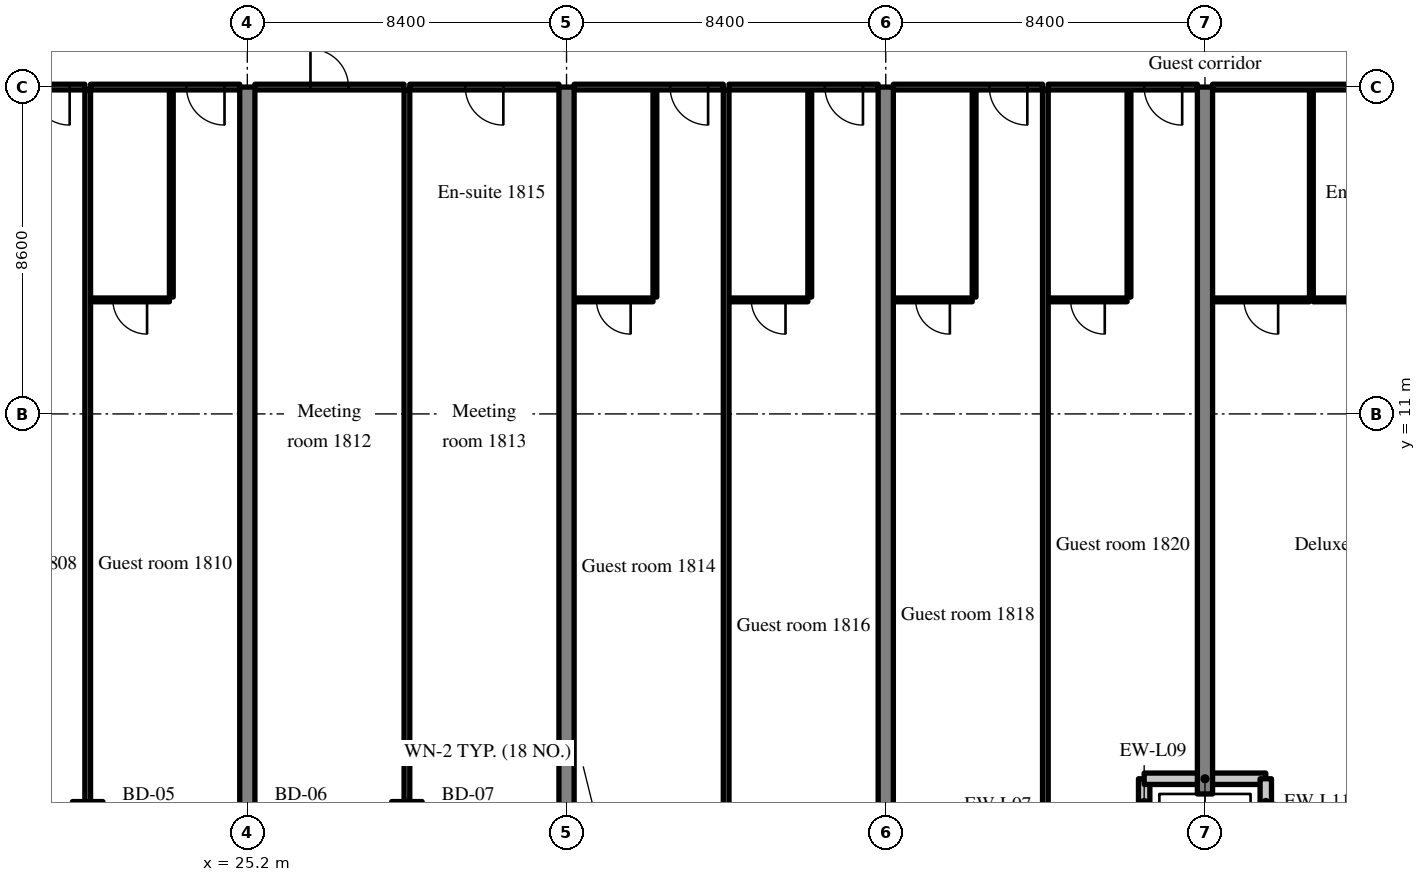
"""IFC4 building model, lengths in metres.
Left out: names, types, materials, properties, quantities, classifications, styles, units other than length and angle.
Written with IfcOpenShell. Run it as: python <this file> out.ifc"""

import sys

from ifc_helpers import new_model, si_unit, direction, frame, frame_2d, origin, origin_2d, place, context, subcontext, project, spatial, rectangle, extrude, source, transform, mapped, element, fill, save


model = new_model("IFC4")
c1 = context("Model", 3, precision=1e-05, world=origin(), true_north=direction((0.0, 1.0)))
c2 = subcontext(c1, "Body", "Model", "MODEL_VIEW")
j1 = project(units=[si_unit("LENGTHUNIT", "METRE"), si_unit("PLANEANGLEUNIT", "RADIAN")], contexts=[c1])
p1 = place(None, origin())
s1 = spatial("IfcSite", under=j1, at=p1, CompositionType="ELEMENT")
p2 = place(p1, origin())
s2 = spatial("IfcBuilding", under=s1, at=p2, CompositionType="ELEMENT")
p3 = place(p2, frame((0.0, 0.0, 77.2)))
s3 = spatial("IfcBuildingStorey", under=s2, at=p3, CompositionType="ELEMENT", Elevation=77.2)
m1 = source(origin(), c2, "Body", "SweptSolid", [
    extrude(rectangle(XDim=19.6, YDim=0.4, at=frame_2d((9.8, 0.0))), origin(), (0.0, 0.0, 1.0), 3.52),
])
for number, where, z_axis, x_axis in (
    (1, (25.2, 0.0, 0.0), (0.0, 0.0, 1.0), (0.0, 1.0, 0.0)),
    (2, (33.6, 0.0, 0.0), (0.0, 0.0, 1.0), (0.0, 1.0, 0.0)),
    (3, (42.0, 0.0, 0.0), (0.0, 0.0, 1.0), (0.0, 1.0, 0.0)),
):
    element("IfcWall", number, at=place(p3, frame(where, z_axis=z_axis, x_axis=x_axis)), inside=s3, PredefinedType="SHEAR", context=c2, shape_type="MappedRepresentation", body=[
        mapped(m1, transform((0.0, 0.0, 0.0), scale=1.0)),
    ])
m2 = source(origin(), c2, "Body", "SweptSolid", [
    extrude(rectangle(XDim=18.6, YDim=0.4, at=frame_2d((9.3, 0.0))), origin(), (0.0, 0.0, 1.0), 3.52),
])
p4 = place(p3, frame((50.4, 1.0, 0.0), z_axis=(0.0, 0.0, 1.0), x_axis=(0.0, 1.0, 0.0)))
e4 = element("IfcWall", 4, at=p4, inside=s3, PredefinedType="SHEAR", context=c2, shape_type="MappedRepresentation", body=[
    mapped(m2, transform((0.0, 0.0, 0.0), scale=1.0)),
])
m3 = source(origin(), c2, "Body", "SweptSolid", [
    extrude(rectangle(XDim=0.8, YDim=0.8, at=origin_2d()), origin(), (0.0, 0.0, 1.0), 3.52),
])
for number, where, z_axis, x_axis in (
    (5, (21.0, 0.4, 0.0), (0.0, 0.0, 1.0), (1.0, 0.0, 0.0)),
    (6, (29.4, 0.4, 0.0), (0.0, 0.0, 1.0), (1.0, 0.0, 0.0)),
):
    element("IfcColumn", number, at=place(p3, frame(where, z_axis=z_axis, x_axis=x_axis)), inside=s3, PredefinedType="COLUMN", context=c2, shape_type="MappedRepresentation", body=[
        mapped(m3, transform((0.0, 0.0, 0.0), scale=1.0)),
    ])
m4 = source(origin(), c2, "Body", "SweptSolid", [
    extrude(rectangle(XDim=1.244, YDim=0.3, at=frame_2d((0.622, 0.0))), origin(), (0.0, 0.0, 1.0), 2.32),
])
p5 = place(p3, frame((48.8, 0.156, 0.0), z_axis=(0.0, 0.0, 1.0), x_axis=(0.0, 1.0, 0.0)))
e7 = element("IfcWall", 7, at=p5, inside=s3, PredefinedType="SOLIDWALL", context=c2, shape_type="MappedRepresentation", body=[
    mapped(m4, transform((0.0, 0.0, 0.0), scale=1.0)),
])
m5 = source(origin(), c2, "Body", "SweptSolid", [
    extrude(rectangle(XDim=3.2, YDim=0.3, at=frame_2d((1.6, 0.0))), origin(), (0.0, 0.0, 1.0), 2.32),
])
p6 = place(p3, frame((48.8, 1.4, 0.0), z_axis=(0.0, 0.0, 1.0), x_axis=(1.0, 0.0, 0.0)))
e8 = element("IfcWall", 8, at=p6, inside=s3, PredefinedType="SOLIDWALL", context=c2, shape_type="MappedRepresentation", body=[
    mapped(m5, transform((0.0, 0.0, 0.0), scale=1.0)),
])
p7 = place(p3, frame((52.0, 1.4, 0.0), z_axis=(0.0, 0.0, 1.0), x_axis=(0.0, -1.0, 0.0)))
e9 = element("IfcWall", 9, at=p7, inside=s3, PredefinedType="SOLIDWALL", context=c2, shape_type="MappedRepresentation", body=[
    mapped(m4, transform((0.0, 0.0, 0.0), scale=1.0)),
])
m6 = source(origin(), c2, "Body", "SweptSolid", [
    extrude(rectangle(XDim=3.925, YDim=0.15, at=frame_2d((1.962, 0.0))), origin(), (0.0, 0.0, 1.0), 2.82),
])
p8 = place(p3, frame((17.0, 19.6, 0.0), z_axis=(0.0, 0.0, 1.0), x_axis=(1.0, 0.0, 0.0)))
e10 = element("IfcWall", 10, at=p8, inside=s3, PredefinedType="PARTITIONING", context=c2, shape_type="MappedRepresentation", body=[
    mapped(m6, transform((0.0, 0.0, 0.0), scale=1.0)),
])
m7 = source(origin(), c2, "Body", "SweptSolid", [
    extrude(rectangle(XDim=1.0, YDim=2.1, at=frame_2d((0.5, 1.05))), frame((0.0, 0.085, 0.0), z_axis=(0.0, -1.0, 0.0), x_axis=(1.0, 0.0, 0.0)), (0.0, 0.0, 1.0), 0.17),
])
p9 = place(p8, frame((2.525, 0.0, 0.0)))
e11 = element("IfcOpeningElement", 11, at=p9, cuts=e10, PredefinedType="OPENING", context=c2, shape_type="MappedRepresentation", body=[
    mapped(m7, transform((0.0, 0.0, 0.0), scale=1.0)),
])
m8 = source(origin(), c2, "Body", "SweptSolid", [
    extrude(rectangle(XDim=5.45, YDim=0.1, at=frame_2d((2.725, 0.0))), origin(), (0.0, 0.0, 1.0), 3.52),
])
p10 = place(p3, frame((23.2, 14.075, 0.0), z_axis=(0.0, 0.0, 1.0), x_axis=(0.0, 1.0, 0.0)))
e12 = element("IfcWall", 12, at=p10, inside=s3, PredefinedType="PARTITIONING", context=c2, shape_type="MappedRepresentation", body=[
    mapped(m8, transform((0.0, 0.0, 0.0), scale=1.0)),
])
m9 = source(origin(), c2, "Body", "SweptSolid", [
    extrude(rectangle(XDim=2.075, YDim=0.1, at=frame_2d((1.038, 0.0))), origin(), (0.0, 0.0, 1.0), 3.52),
])
p11 = place(p3, frame((21.075, 14.0, 0.0), z_axis=(0.0, 0.0, 1.0), x_axis=(1.0, 0.0, 0.0)))
e13 = element("IfcWall", 13, at=p11, inside=s3, PredefinedType="PARTITIONING", context=c2, shape_type="MappedRepresentation", body=[
    mapped(m9, transform((0.0, 0.0, 0.0), scale=1.0)),
])
m10 = source(origin(), c2, "Body", "SweptSolid", [
    extrude(rectangle(XDim=0.9, YDim=2.1, at=frame_2d((0.45, 1.05))), frame((0.0, 0.06, 0.0), z_axis=(0.0, -1.0, 0.0), x_axis=(1.0, 0.0, 0.0)), (0.0, 0.0, 1.0), 0.12),
])
p12 = place(p11, frame((0.587, 0.0, 0.0)))
e14 = element("IfcOpeningElement", 14, at=p12, cuts=e13, PredefinedType="OPENING", context=c2, shape_type="MappedRepresentation", body=[
    mapped(m10, transform((0.0, 0.0, 0.0), scale=1.0)),
])
p13 = place(p3, frame((21.075, 19.6, 0.0), z_axis=(0.0, 0.0, 1.0), x_axis=(1.0, 0.0, 0.0)))
e15 = element("IfcWall", 15, at=p13, inside=s3, PredefinedType="PARTITIONING", context=c2, shape_type="MappedRepresentation", body=[
    mapped(m6, transform((0.0, 0.0, 0.0), scale=1.0)),
])
p14 = place(p13, frame((2.525, 0.0, 0.0)))
e16 = element("IfcOpeningElement", 16, at=p14, cuts=e15, PredefinedType="OPENING", context=c2, shape_type="MappedRepresentation", body=[
    mapped(m7, transform((0.0, 0.0, 0.0), scale=1.0)),
])
m11 = source(origin(), c2, "Body", "SweptSolid", [
    extrude(rectangle(XDim=18.725, YDim=0.15, at=frame_2d((9.362, 0.0))), origin(), (0.0, 0.0, 1.0), 3.52),
])
p15 = place(p3, frame((21.0, 0.8, 0.0), z_axis=(0.0, 0.0, 1.0), x_axis=(0.0, 1.0, 0.0)))
e17 = element("IfcWall", 17, at=p15, inside=s3, PredefinedType="PARTITIONING", context=c2, shape_type="MappedRepresentation", body=[
    mapped(m11, transform((0.0, 0.0, 0.0), scale=1.0)),
])
p16 = place(p3, frame((25.4, 19.6, 0.0), z_axis=(0.0, 0.0, 1.0), x_axis=(1.0, 0.0, 0.0)))
e18 = element("IfcWall", 18, at=p16, inside=s3, PredefinedType="PARTITIONING", context=c2, shape_type="MappedRepresentation", body=[
    mapped(m6, transform((0.0, 0.0, 0.0), scale=1.0)),
])
p17 = place(p16, frame((1.462, 0.0, 0.0)))
e19 = element("IfcOpeningElement", 19, at=p17, cuts=e18, PredefinedType="OPENING", context=c2, shape_type="MappedRepresentation", body=[
    mapped(m7, transform((0.0, 0.0, 0.0), scale=1.0)),
])
m12 = source(origin(), c2, "Body", "SweptSolid", [
    extrude(rectangle(XDim=3.925, YDim=0.15, at=frame_2d((1.962, 0.0))), origin(), (0.0, 0.0, 1.0), 2.82),
])
p18 = place(p3, frame((29.475, 19.6, 0.0), z_axis=(0.0, 0.0, 1.0), x_axis=(1.0, 0.0, 0.0)))
e20 = element("IfcWall", 20, at=p18, inside=s3, PredefinedType="PARTITIONING", context=c2, shape_type="MappedRepresentation", body=[
    mapped(m12, transform((0.0, 0.0, 0.0), scale=1.0)),
])
p19 = place(p18, frame((1.462, 0.0, 0.0)))
e21 = element("IfcOpeningElement", 21, at=p19, cuts=e20, PredefinedType="OPENING", context=c2, shape_type="MappedRepresentation", body=[
    mapped(m7, transform((0.0, 0.0, 0.0), scale=1.0)),
])
p20 = place(p3, frame((29.4, 0.8, 0.0), z_axis=(0.0, 0.0, 1.0), x_axis=(0.0, 1.0, 0.0)))
e22 = element("IfcWall", 22, at=p20, inside=s3, PredefinedType="PARTITIONING", context=c2, shape_type="MappedRepresentation", body=[
    mapped(m11, transform((0.0, 0.0, 0.0), scale=1.0)),
])
p21 = place(p3, frame((35.925, 14.075, 0.0), z_axis=(0.0, 0.0, 1.0), x_axis=(0.0, 1.0, 0.0)))
e23 = element("IfcWall", 23, at=p21, inside=s3, PredefinedType="PARTITIONING", context=c2, shape_type="MappedRepresentation", body=[
    mapped(m8, transform((0.0, 0.0, 0.0), scale=1.0)),
])
p22 = place(p3, frame((33.8, 14.0, 0.0), z_axis=(0.0, 0.0, 1.0), x_axis=(1.0, 0.0, 0.0)))
e24 = element("IfcWall", 24, at=p22, inside=s3, PredefinedType="PARTITIONING", context=c2, shape_type="MappedRepresentation", body=[
    mapped(m9, transform((0.0, 0.0, 0.0), scale=1.0)),
])
p23 = place(p22, frame((0.587, 0.0, 0.0)))
e25 = element("IfcOpeningElement", 25, at=p23, cuts=e24, PredefinedType="OPENING", context=c2, shape_type="MappedRepresentation", body=[
    mapped(m10, transform((0.0, 0.0, 0.0), scale=1.0)),
])
p24 = place(p3, frame((33.8, 19.6, 0.0), z_axis=(0.0, 0.0, 1.0), x_axis=(1.0, 0.0, 0.0)))
e26 = element("IfcWall", 26, at=p24, inside=s3, PredefinedType="PARTITIONING", context=c2, shape_type="MappedRepresentation", body=[
    mapped(m6, transform((0.0, 0.0, 0.0), scale=1.0)),
])
p25 = place(p24, frame((2.525, 0.0, 0.0)))
e27 = element("IfcOpeningElement", 27, at=p25, cuts=e26, PredefinedType="OPENING", context=c2, shape_type="MappedRepresentation", body=[
    mapped(m7, transform((0.0, 0.0, 0.0), scale=1.0)),
])
p26 = place(p3, frame((40.0, 14.075, 0.0), z_axis=(0.0, 0.0, 1.0), x_axis=(0.0, 1.0, 0.0)))
e28 = element("IfcWall", 28, at=p26, inside=s3, PredefinedType="PARTITIONING", context=c2, shape_type="MappedRepresentation", body=[
    mapped(m8, transform((0.0, 0.0, 0.0), scale=1.0)),
])
p27 = place(p3, frame((37.875, 14.0, 0.0), z_axis=(0.0, 0.0, 1.0), x_axis=(1.0, 0.0, 0.0)))
e29 = element("IfcWall", 29, at=p27, inside=s3, PredefinedType="PARTITIONING", context=c2, shape_type="MappedRepresentation", body=[
    mapped(m9, transform((0.0, 0.0, 0.0), scale=1.0)),
])
p28 = place(p27, frame((0.587, 0.0, 0.0)))
e30 = element("IfcOpeningElement", 30, at=p28, cuts=e29, PredefinedType="OPENING", context=c2, shape_type="MappedRepresentation", body=[
    mapped(m10, transform((0.0, 0.0, 0.0), scale=1.0)),
])
p29 = place(p3, frame((37.875, 19.6, 0.0), z_axis=(0.0, 0.0, 1.0), x_axis=(1.0, 0.0, 0.0)))
e31 = element("IfcWall", 31, at=p29, inside=s3, PredefinedType="PARTITIONING", context=c2, shape_type="MappedRepresentation", body=[
    mapped(m6, transform((0.0, 0.0, 0.0), scale=1.0)),
])
p30 = place(p29, frame((2.525, 0.0, 0.0)))
e32 = element("IfcOpeningElement", 32, at=p30, cuts=e31, PredefinedType="OPENING", context=c2, shape_type="MappedRepresentation", body=[
    mapped(m7, transform((0.0, 0.0, 0.0), scale=1.0)),
])
m13 = source(origin(), c2, "Body", "SweptSolid", [
    extrude(rectangle(XDim=20.998, YDim=0.15, at=frame_2d((10.499, 0.0))), origin(), (0.0, 0.0, 1.0), 3.52),
])
p31 = place(p3, frame((37.8, -1.473, 0.0), z_axis=(0.0, 0.0, 1.0), x_axis=(0.0, 1.0, 0.0)))
e33 = element("IfcWall", 33, at=p31, inside=s3, PredefinedType="PARTITIONING", context=c2, shape_type="MappedRepresentation", body=[
    mapped(m13, transform((0.0, 0.0, 0.0), scale=1.0)),
])
p32 = place(p3, frame((44.325, 14.075, 0.0), z_axis=(0.0, 0.0, 1.0), x_axis=(0.0, 1.0, 0.0)))
e34 = element("IfcWall", 34, at=p32, inside=s3, PredefinedType="PARTITIONING", context=c2, shape_type="MappedRepresentation", body=[
    mapped(m8, transform((0.0, 0.0, 0.0), scale=1.0)),
])
p33 = place(p3, frame((42.2, 14.0, 0.0), z_axis=(0.0, 0.0, 1.0), x_axis=(1.0, 0.0, 0.0)))
e35 = element("IfcWall", 35, at=p33, inside=s3, PredefinedType="PARTITIONING", context=c2, shape_type="MappedRepresentation", body=[
    mapped(m9, transform((0.0, 0.0, 0.0), scale=1.0)),
])
p34 = place(p33, frame((0.587, 0.0, 0.0)))
e36 = element("IfcOpeningElement", 36, at=p34, cuts=e35, PredefinedType="OPENING", context=c2, shape_type="MappedRepresentation", body=[
    mapped(m10, transform((0.0, 0.0, 0.0), scale=1.0)),
])
p35 = place(p3, frame((42.2, 19.6, 0.0), z_axis=(0.0, 0.0, 1.0), x_axis=(1.0, 0.0, 0.0)))
e37 = element("IfcWall", 37, at=p35, inside=s3, PredefinedType="PARTITIONING", context=c2, shape_type="MappedRepresentation", body=[
    mapped(m6, transform((0.0, 0.0, 0.0), scale=1.0)),
])
p36 = place(p35, frame((2.525, 0.0, 0.0)))
e38 = element("IfcOpeningElement", 38, at=p36, cuts=e37, PredefinedType="OPENING", context=c2, shape_type="MappedRepresentation", body=[
    mapped(m7, transform((0.0, 0.0, 0.0), scale=1.0)),
])
p37 = place(p3, frame((48.4, 14.075, 0.0), z_axis=(0.0, 0.0, 1.0), x_axis=(0.0, 1.0, 0.0)))
e39 = element("IfcWall", 39, at=p37, inside=s3, PredefinedType="PARTITIONING", context=c2, shape_type="MappedRepresentation", body=[
    mapped(m8, transform((0.0, 0.0, 0.0), scale=1.0)),
])
m14 = source(origin(), c2, "Body", "SweptSolid", [
    extrude(rectangle(XDim=2.075, YDim=0.1, at=frame_2d((1.038, 0.0))), origin(), (0.0, 0.0, 1.0), 3.52),
])
p38 = place(p3, frame((46.275, 14.0, 0.0), z_axis=(0.0, 0.0, 1.0), x_axis=(1.0, 0.0, 0.0)))
e40 = element("IfcWall", 40, at=p38, inside=s3, PredefinedType="PARTITIONING", context=c2, shape_type="MappedRepresentation", body=[
    mapped(m14, transform((0.0, 0.0, 0.0), scale=1.0)),
])
p39 = place(p38, frame((0.588, 0.0, 0.0)))
e41 = element("IfcOpeningElement", 41, at=p39, cuts=e40, PredefinedType="OPENING", context=c2, shape_type="MappedRepresentation", body=[
    mapped(m10, transform((0.0, 0.0, 0.0), scale=1.0)),
])
p40 = place(p3, frame((46.275, 19.6, 0.0), z_axis=(0.0, 0.0, 1.0), x_axis=(1.0, 0.0, 0.0)))
e42 = element("IfcWall", 42, at=p40, inside=s3, PredefinedType="PARTITIONING", context=c2, shape_type="MappedRepresentation", body=[
    mapped(m6, transform((0.0, 0.0, 0.0), scale=1.0)),
])
p41 = place(p40, frame((2.525, 0.0, 0.0)))
e43 = element("IfcOpeningElement", 43, at=p41, cuts=e42, PredefinedType="OPENING", context=c2, shape_type="MappedRepresentation", body=[
    mapped(m7, transform((0.0, 0.0, 0.0), scale=1.0)),
])
m15 = source(origin(), c2, "Body", "SweptSolid", [
    extrude(rectangle(XDim=20.406, YDim=0.15, at=frame_2d((10.203, 0.0))), origin(), (0.0, 0.0, 1.0), 3.52),
])
p42 = place(p3, frame((46.2, -0.881, 0.0), z_axis=(0.0, 0.0, 1.0), x_axis=(0.0, 1.0, 0.0)))
e44 = element("IfcWall", 44, at=p42, inside=s3, PredefinedType="PARTITIONING", context=c2, shape_type="MappedRepresentation", body=[
    mapped(m15, transform((0.0, 0.0, 0.0), scale=1.0)),
])
p43 = place(p3, frame((53.2, 14.075, 0.0), z_axis=(0.0, 0.0, 1.0), x_axis=(0.0, 1.0, 0.0)))
e45 = element("IfcWall", 45, at=p43, inside=s3, PredefinedType="PARTITIONING", context=c2, shape_type="MappedRepresentation", body=[
    mapped(m8, transform((0.0, 0.0, 0.0), scale=1.0)),
])
m16 = source(origin(), c2, "Body", "SweptSolid", [
    extrude(rectangle(XDim=3.5, YDim=0.1, at=frame_2d((1.75, 0.0))), origin(), (0.0, 0.0, 1.0), 3.52),
])
p44 = place(p3, frame((53.25, 14.0, 0.0), z_axis=(0.0, 0.0, 1.0), x_axis=(1.0, 0.0, 0.0)))
e46 = element("IfcWall", 46, at=p44, inside=s3, PredefinedType="PARTITIONING", context=c2, shape_type="MappedRepresentation", body=[
    mapped(m16, transform((0.0, 0.0, 0.0), scale=1.0)),
])
p45 = place(p44, frame((1.3, 0.0, 0.0)))
e47 = element("IfcOpeningElement", 47, at=p45, cuts=e46, PredefinedType="OPENING", context=c2, shape_type="MappedRepresentation", body=[
    mapped(m10, transform((0.0, 0.0, 0.0), scale=1.0)),
])
m17 = source(origin(), c2, "Body", "SweptSolid", [
    extrude(rectangle(XDim=2.55, YDim=0.1, at=frame_2d((1.275, 0.0))), origin(), (0.0, 0.0, 1.0), 3.52),
])
p46 = place(p3, frame((50.6, 14.0, 0.0), z_axis=(0.0, 0.0, 1.0), x_axis=(1.0, 0.0, 0.0)))
e48 = element("IfcWall", 48, at=p46, inside=s3, PredefinedType="PARTITIONING", context=c2, shape_type="MappedRepresentation", body=[
    mapped(m17, transform((0.0, 0.0, 0.0), scale=1.0)),
])
p47 = place(p46, frame((0.825, 0.0, 0.0)))
e49 = element("IfcOpeningElement", 49, at=p47, cuts=e48, PredefinedType="OPENING", context=c2, shape_type="MappedRepresentation", body=[
    mapped(m10, transform((0.0, 0.0, 0.0), scale=1.0)),
])
m18 = source(origin(), c2, "Body", "SweptSolid", [
    extrude(rectangle(XDim=8.0, YDim=0.15, at=frame_2d((4.0, 0.0))), origin(), (0.0, 0.0, 1.0), 2.82),
])
p48 = place(p3, frame((50.6, 19.6, 0.0), z_axis=(0.0, 0.0, 1.0), x_axis=(1.0, 0.0, 0.0)))
e50 = element("IfcWall", 50, at=p48, inside=s3, PredefinedType="PARTITIONING", context=c2, shape_type="MappedRepresentation", body=[
    mapped(m18, transform((0.0, 0.0, 0.0), scale=1.0)),
])
p49 = place(p48, frame((6.6, 0.0, 0.0)))
e51 = element("IfcOpeningElement", 51, at=p49, cuts=e50, PredefinedType="OPENING", context=c2, shape_type="MappedRepresentation", body=[
    mapped(m7, transform((0.0, 0.0, 0.0), scale=1.0)),
])
m19 = source(origin(), c2, "Body", "SweptSolid", [
    extrude(rectangle(XDim=1.0, YDim=2.1, at=frame_2d((0.5, 1.05))), frame((0.0, 0.025, 0.0), z_axis=(0.0, -1.0, 0.0), x_axis=(1.0, 0.0, 0.0)), (0.0, 0.0, 1.0), 0.05),
])
p50 = place(p9, origin())
e52 = element("IfcDoor", 52, at=p50, inside=s3, OperationType="SINGLE_SWING_RIGHT", PredefinedType="DOOR", context=c2, shape_type="MappedRepresentation", body=[
    mapped(m19, transform((0.0, 0.0, 0.0), scale=1.0)),
])
fill(e11, e52)
m20 = source(origin(), c2, "Body", "SweptSolid", [
    extrude(rectangle(XDim=0.9, YDim=2.1, at=frame_2d((0.45, 1.05))), frame((0.0, 0.025, 0.0), z_axis=(0.0, -1.0, 0.0), x_axis=(1.0, 0.0, 0.0)), (0.0, 0.0, 1.0), 0.05),
])
p51 = place(p12, origin())
e53 = element("IfcDoor", 53, at=p51, inside=s3, OperationType="SINGLE_SWING_RIGHT", PredefinedType="DOOR", context=c2, shape_type="MappedRepresentation", body=[
    mapped(m20, transform((0.0, 0.0, 0.0), scale=1.0)),
])
fill(e14, e53)
p52 = place(p14, origin())
e54 = element("IfcDoor", 54, at=p52, inside=s3, OperationType="SINGLE_SWING_RIGHT", PredefinedType="DOOR", context=c2, shape_type="MappedRepresentation", body=[
    mapped(m19, transform((0.0, 0.0, 0.0), scale=1.0)),
])
fill(e16, e54)
p53 = place(p17, origin())
e55 = element("IfcDoor", 55, at=p53, inside=s3, OperationType="SINGLE_SWING_LEFT", PredefinedType="DOOR", context=c2, shape_type="MappedRepresentation", body=[
    mapped(m19, transform((0.0, 0.0, 0.0), scale=1.0)),
])
fill(e19, e55)
p54 = place(p19, origin())
e56 = element("IfcDoor", 56, at=p54, inside=s3, OperationType="SINGLE_SWING_RIGHT", PredefinedType="DOOR", context=c2, shape_type="MappedRepresentation", body=[
    mapped(m19, transform((0.0, 0.0, 0.0), scale=1.0)),
])
fill(e21, e56)
p55 = place(p23, origin())
e57 = element("IfcDoor", 57, at=p55, inside=s3, OperationType="SINGLE_SWING_RIGHT", PredefinedType="DOOR", context=c2, shape_type="MappedRepresentation", body=[
    mapped(m20, transform((0.0, 0.0, 0.0), scale=1.0)),
])
fill(e25, e57)
p56 = place(p25, origin())
e58 = element("IfcDoor", 58, at=p56, inside=s3, OperationType="SINGLE_SWING_RIGHT", PredefinedType="DOOR", context=c2, shape_type="MappedRepresentation", body=[
    mapped(m19, transform((0.0, 0.0, 0.0), scale=1.0)),
])
fill(e27, e58)
p57 = place(p28, origin())
e59 = element("IfcDoor", 59, at=p57, inside=s3, OperationType="SINGLE_SWING_RIGHT", PredefinedType="DOOR", context=c2, shape_type="MappedRepresentation", body=[
    mapped(m20, transform((0.0, 0.0, 0.0), scale=1.0)),
])
fill(e30, e59)
p58 = place(p30, origin())
e60 = element("IfcDoor", 60, at=p58, inside=s3, OperationType="SINGLE_SWING_RIGHT", PredefinedType="DOOR", context=c2, shape_type="MappedRepresentation", body=[
    mapped(m19, transform((0.0, 0.0, 0.0), scale=1.0)),
])
fill(e32, e60)
p59 = place(p34, origin())
e61 = element("IfcDoor", 61, at=p59, inside=s3, OperationType="SINGLE_SWING_RIGHT", PredefinedType="DOOR", context=c2, shape_type="MappedRepresentation", body=[
    mapped(m20, transform((0.0, 0.0, 0.0), scale=1.0)),
])
fill(e36, e61)
p60 = place(p36, origin())
e62 = element("IfcDoor", 62, at=p60, inside=s3, OperationType="SINGLE_SWING_RIGHT", PredefinedType="DOOR", context=c2, shape_type="MappedRepresentation", body=[
    mapped(m19, transform((0.0, 0.0, 0.0), scale=1.0)),
])
fill(e38, e62)
p61 = place(p39, origin())
e63 = element("IfcDoor", 63, at=p61, inside=s3, OperationType="SINGLE_SWING_RIGHT", PredefinedType="DOOR", context=c2, shape_type="MappedRepresentation", body=[
    mapped(m20, transform((0.0, 0.0, 0.0), scale=1.0)),
])
fill(e41, e63)
p62 = place(p41, origin())
e64 = element("IfcDoor", 64, at=p62, inside=s3, OperationType="SINGLE_SWING_RIGHT", PredefinedType="DOOR", context=c2, shape_type="MappedRepresentation", body=[
    mapped(m19, transform((0.0, 0.0, 0.0), scale=1.0)),
])
fill(e43, e64)
p63 = place(p47, origin())
e65 = element("IfcDoor", 65, at=p63, inside=s3, OperationType="SINGLE_SWING_RIGHT", PredefinedType="DOOR", context=c2, shape_type="MappedRepresentation", body=[
    mapped(m20, transform((0.0, 0.0, 0.0), scale=1.0)),
])
fill(e49, e65)
save(model, sys.argv[1])
